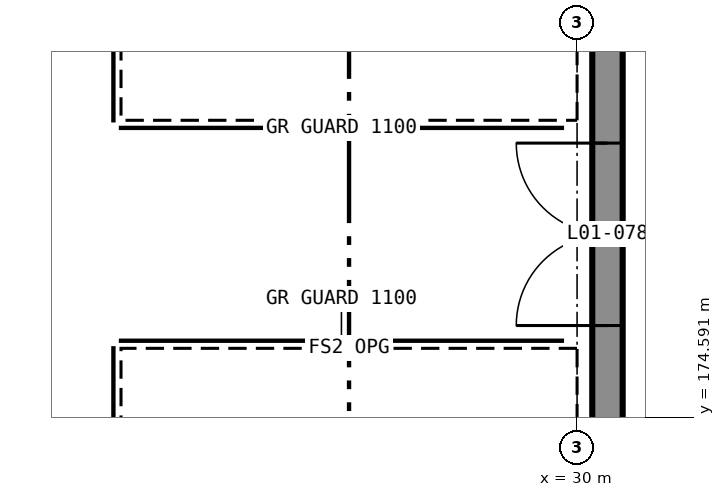
"""IFC4 building model, lengths in metres.
Left out: names, types, materials, properties, quantities, classifications, styles, units other than length and angle.
Written with IfcOpenShell. Run it as: python <this file> out.ifc"""

import sys

from ifc_helpers import new_model, si_unit, direction, frame, frame_2d, origin, place, context, subcontext, project, spatial, rectangle, extrude, element, fill, save


model = new_model("IFC4")
c1 = context("Model", 3, precision=1e-05, world=origin(), true_north=direction((0.0, 1.0)))
c2 = subcontext(c1, "Body", "Model", "MODEL_VIEW")
j1 = project(units=[si_unit("LENGTHUNIT", "METRE"), si_unit("PLANEANGLEUNIT", "RADIAN")], contexts=[c1])
p1 = place(None, origin())
s1 = spatial("IfcSite", under=j1, at=p1, CompositionType="ELEMENT")
p2 = place(p1, origin())
s2 = spatial("IfcBuilding", under=s1, at=p2, CompositionType="ELEMENT")
p3 = place(p2, frame((0.0, 0.0, 6.0)))
s3 = spatial("IfcBuildingStorey", under=s2, at=p3, CompositionType="ELEMENT", Elevation=6.0)
p4 = place(p3, frame((30.4, 174.5, 0.0), z_axis=(0.0, 0.0, 1.0), x_axis=(0.0, 1.0, 0.0)))
e1 = element("IfcWall", 1, at=p4, inside=s3, PredefinedType="SOLIDWALL", context=c2, shape_type="SweptSolid", body=[
    extrude(rectangle(XDim=11.0, YDim=0.4, at=frame_2d((5.5, 0.0))), origin(), (0.0, 0.0, 1.0), 6.0),
])
p5 = place(p4, frame((1.3, 0.0, 0.0)))
e2 = element("IfcOpeningElement", 2, at=p5, cuts=e1, PredefinedType="OPENING", context=c2, shape_type="SweptSolid", body=[
    extrude(rectangle(XDim=2.4, YDim=2.4, at=frame_2d((1.2, 1.2))), frame((0.0, 0.21, 0.0), z_axis=(0.0, -1.0, 0.0), x_axis=(1.0, 0.0, 0.0)), (0.0, 0.0, 1.0), 0.42),
])
p6 = place(p5, origin())
e3 = element("IfcDoor", 3, at=p6, inside=s3, OperationType="DOUBLE_DOOR_SINGLE_SWING", PredefinedType="DOOR", context=c2, shape_type="SweptSolid", body=[
    extrude(rectangle(XDim=2.4, YDim=2.4, at=frame_2d((1.2, 1.2))), frame((0.0, 0.025, 0.0), z_axis=(0.0, -1.0, 0.0), x_axis=(1.0, 0.0, 0.0)), (0.0, 0.0, 1.0), 0.05),
])
fill(e2, e3)
save(model, sys.argv[1])
